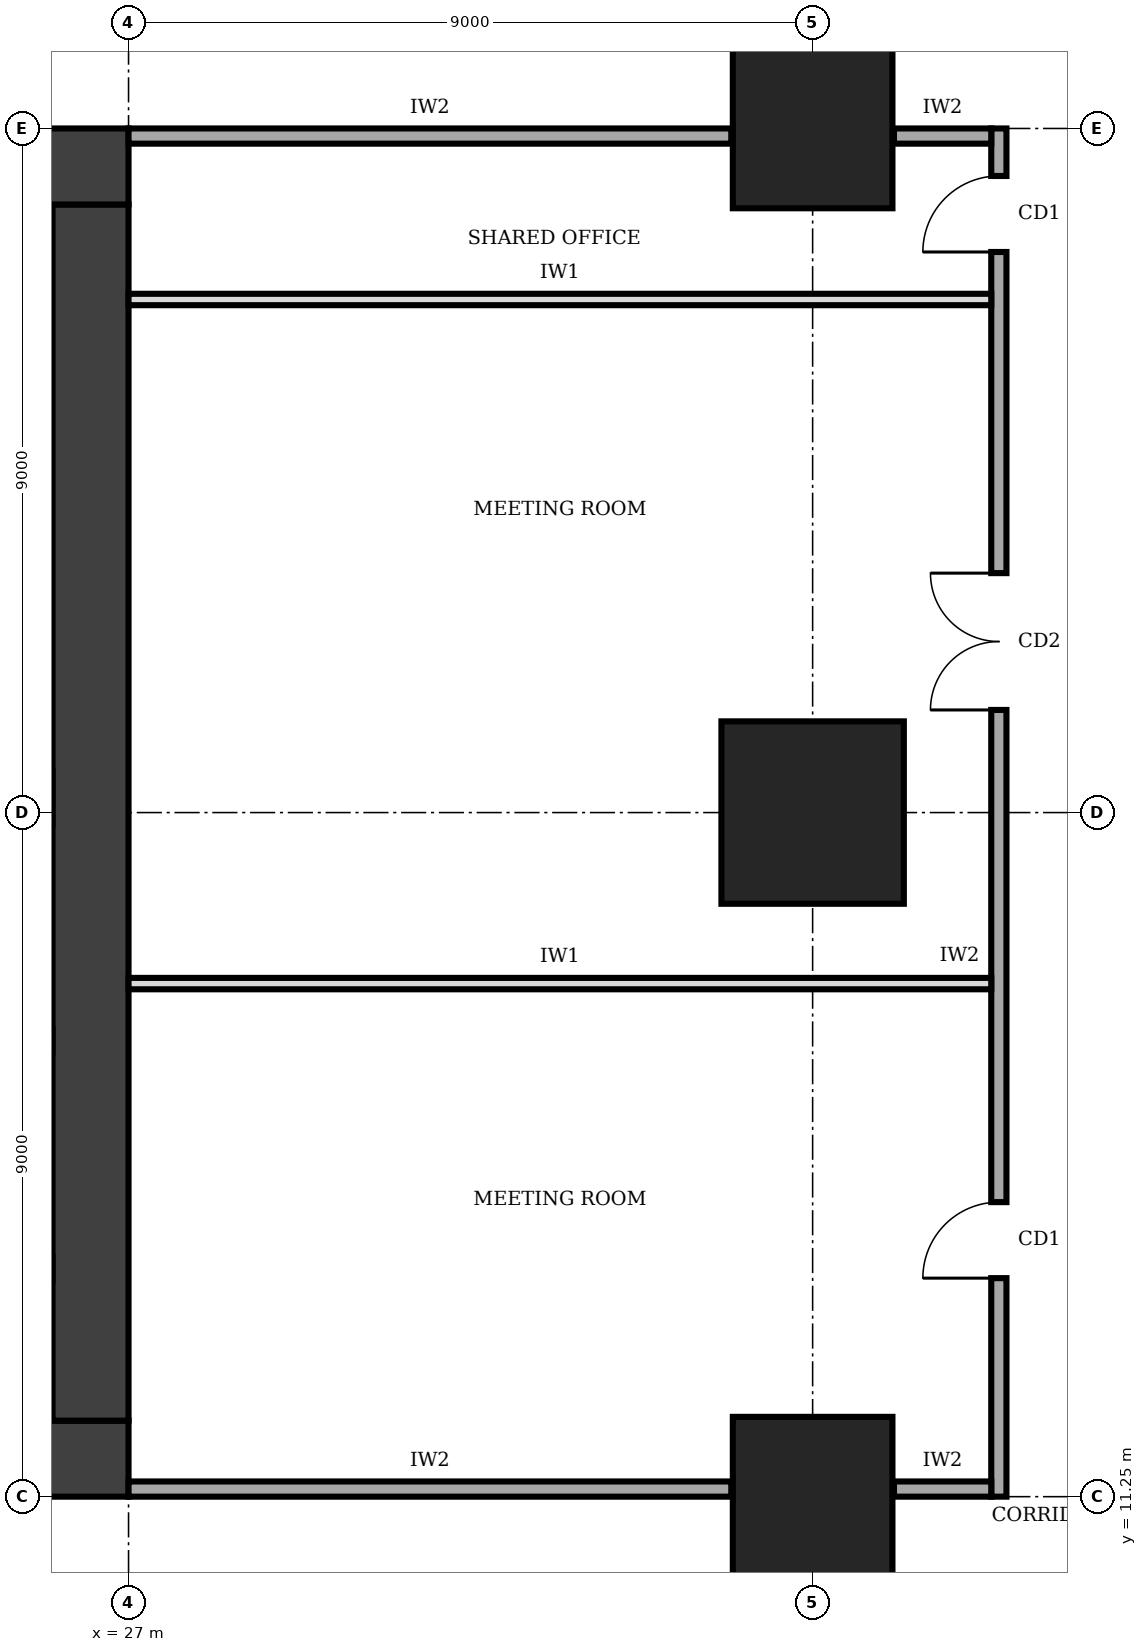
"""IFC4 building model, lengths in metres.
Left out: names, types, materials, properties, quantities, classifications, styles, units other than length and angle.
Written with IfcOpenShell. Run it as: python <this file> out.ifc"""

import sys

from ifc_helpers import new_model, si_unit, direction, frame, frame_2d, origin, origin_2d, place, context, subcontext, project, spatial, rectangle, extrude, element, fill, save


model = new_model("IFC4")
c1 = context("Model", 3, precision=1e-05, world=origin(), true_north=direction((0.0, 1.0)))
c2 = subcontext(c1, "Body", "Model", "MODEL_VIEW")
j1 = project(units=[si_unit("LENGTHUNIT", "METRE"), si_unit("PLANEANGLEUNIT", "RADIAN")], contexts=[c1])
p1 = place(None, origin())
s1 = spatial("IfcSite", under=j1, at=p1, CompositionType="ELEMENT")
p2 = place(p1, origin())
s2 = spatial("IfcBuilding", under=s1, at=p2, CompositionType="ELEMENT")
p3 = place(p2, frame((0.0, 0.0, 141.0)))
s3 = spatial("IfcBuildingStorey", under=s2, at=p3, CompositionType="ELEMENT", Elevation=141.0)
p4 = place(p3, frame((13.5, 11.75, 0.0), z_axis=(0.0, 0.0, 1.0), x_axis=(1.0, 0.0, 0.0)))
e1 = element("IfcWall", 1, at=p4, inside=s3, PredefinedType="SHEAR", context=c2, shape_type="SweptSolid", body=[
    extrude(rectangle(XDim=13.5, YDim=1.0, at=frame_2d((6.75, 0.0))), origin(), (0.0, 0.0, 1.0), 4.0),
])
p5 = place(p4, frame((4.75, 0.0, 0.0)))
e2 = element("IfcOpeningElement", 2, at=p5, cuts=e1, PredefinedType="OPENING", context=c2, shape_type="SweptSolid", body=[
    extrude(rectangle(XDim=1.0, YDim=2.1, at=frame_2d((0.5, 1.05))), frame((0.0, 0.51, 0.0), z_axis=(0.0, -1.0, 0.0), x_axis=(1.0, 0.0, 0.0)), (0.0, 0.0, 1.0), 1.02),
])
p6 = place(p3, frame((26.5, 12.25, 0.0), z_axis=(0.0, 0.0, 1.0), x_axis=(0.0, 1.0, 0.0)))
e3 = element("IfcWall", 3, at=p6, inside=s3, PredefinedType="SHEAR", context=c2, shape_type="SweptSolid", body=[
    extrude(rectangle(XDim=16.0, YDim=1.0, at=frame_2d((8.0, 0.0))), origin(), (0.0, 0.0, 1.0), 4.0),
])
p7 = place(p3, frame((27.0, 28.75, 0.0), z_axis=(0.0, 0.0, 1.0), x_axis=(-1.0, 0.0, 0.0)))
e4 = element("IfcWall", 4, at=p7, inside=s3, PredefinedType="SHEAR", context=c2, shape_type="SweptSolid", body=[
    extrude(rectangle(XDim=13.5, YDim=1.0, at=frame_2d((6.75, 0.0))), origin(), (0.0, 0.0, 1.0), 4.0),
])
p8 = place(p7, frame((4.75, 0.0, 0.0)))
e5 = element("IfcOpeningElement", 5, at=p8, cuts=e4, PredefinedType="OPENING", context=c2, shape_type="SweptSolid", body=[
    extrude(rectangle(XDim=1.8, YDim=2.1, at=frame_2d((0.9, 1.05))), frame((0.0, 0.51, 0.0), z_axis=(0.0, -1.0, 0.0), x_axis=(1.0, 0.0, 0.0)), (0.0, 0.0, 1.0), 1.02),
])
p9 = place(p3, frame((36.0, 11.25, 0.0), z_axis=(0.0, 0.0, 1.0), x_axis=(1.0, 0.0, 0.0)))
e6 = element("IfcColumn", 6, at=p9, inside=s3, PredefinedType="COLUMN", context=c2, shape_type="SweptSolid", body=[
    extrude(rectangle(XDim=2.1, YDim=2.1, at=origin_2d()), origin(), (0.0, 0.0, 1.0), 4.0),
])
p10 = place(p3, frame((36.0, 20.25, 0.0), z_axis=(0.0, 0.0, 1.0), x_axis=(1.0, 0.0, 0.0)))
e7 = element("IfcColumn", 7, at=p10, inside=s3, PredefinedType="COLUMN", context=c2, shape_type="SweptSolid", body=[
    extrude(rectangle(XDim=2.4, YDim=2.4, at=origin_2d()), origin(), (0.0, 0.0, 1.0), 4.0),
])
p11 = place(p3, frame((36.0, 29.25, 0.0), z_axis=(0.0, 0.0, 1.0), x_axis=(1.0, 0.0, 0.0)))
e8 = element("IfcColumn", 8, at=p11, inside=s3, PredefinedType="COLUMN", context=c2, shape_type="SweptSolid", body=[
    extrude(rectangle(XDim=2.1, YDim=2.1, at=origin_2d()), origin(), (0.0, 0.0, 1.0), 4.0),
])
p12 = place(p3, frame((38.45, 11.25, 0.0), z_axis=(0.0, 0.0, 1.0), x_axis=(0.0, 1.0, 0.0)))
e9 = element("IfcWall", 9, at=p12, inside=s3, PredefinedType="SOLIDWALL", context=c2, shape_type="SweptSolid", body=[
    extrude(rectangle(XDim=18.0, YDim=0.2, at=frame_2d((9.0, 0.0))), origin(), (0.0, 0.0, 1.0), 3.75),
])
p13 = place(p12, frame((2.875, 0.0, 0.0)))
e10 = element("IfcOpeningElement", 10, at=p13, cuts=e9, PredefinedType="OPENING", context=c2, shape_type="SweptSolid", body=[
    extrude(rectangle(XDim=1.0, YDim=2.1, at=frame_2d((0.5, 1.05))), frame((0.0, 0.11, 0.0), z_axis=(0.0, -1.0, 0.0), x_axis=(1.0, 0.0, 0.0)), (0.0, 0.0, 1.0), 0.22),
])
p14 = place(p12, frame((10.35, 0.0, 0.0)))
e11 = element("IfcOpeningElement", 11, at=p14, cuts=e9, PredefinedType="OPENING", context=c2, shape_type="SweptSolid", body=[
    extrude(rectangle(XDim=1.8, YDim=2.1, at=frame_2d((0.9, 1.05))), frame((0.0, 0.11, 0.0), z_axis=(0.0, -1.0, 0.0), x_axis=(1.0, 0.0, 0.0)), (0.0, 0.0, 1.0), 0.22),
])
p15 = place(p12, frame((16.375, 0.0, 0.0)))
e12 = element("IfcOpeningElement", 12, at=p15, cuts=e9, PredefinedType="OPENING", context=c2, shape_type="SweptSolid", body=[
    extrude(rectangle(XDim=1.0, YDim=2.1, at=frame_2d((0.5, 1.05))), frame((0.0, 0.11, 0.0), z_axis=(0.0, -1.0, 0.0), x_axis=(1.0, 0.0, 0.0)), (0.0, 0.0, 1.0), 0.22),
])
p16 = place(p3, frame((27.0, 11.35, 0.0), z_axis=(0.0, 0.0, 1.0), x_axis=(1.0, 0.0, 0.0)))
e13 = element("IfcWall", 13, at=p16, inside=s3, PredefinedType="SOLIDWALL", context=c2, shape_type="SweptSolid", body=[
    extrude(rectangle(XDim=7.93, YDim=0.2, at=frame_2d((3.965, 0.0))), origin(), (0.0, 0.0, 1.0), 2.85),
])
p17 = place(p3, frame((37.07, 11.35, 0.0), z_axis=(0.0, 0.0, 1.0), x_axis=(1.0, 0.0, 0.0)))
e14 = element("IfcWall", 14, at=p17, inside=s3, PredefinedType="SOLIDWALL", context=c2, shape_type="SweptSolid", body=[
    extrude(rectangle(XDim=1.28, YDim=0.2, at=frame_2d((0.64, 0.0))), origin(), (0.0, 0.0, 1.0), 2.85),
])
p18 = place(p3, frame((27.0, 29.15, 0.0), z_axis=(0.0, 0.0, 1.0), x_axis=(1.0, 0.0, 0.0)))
e15 = element("IfcWall", 15, at=p18, inside=s3, PredefinedType="SOLIDWALL", context=c2, shape_type="SweptSolid", body=[
    extrude(rectangle(XDim=7.93, YDim=0.2, at=frame_2d((3.965, 0.0))), origin(), (0.0, 0.0, 1.0), 2.85),
])
p19 = place(p3, frame((37.07, 29.15, 0.0), z_axis=(0.0, 0.0, 1.0), x_axis=(1.0, 0.0, 0.0)))
e16 = element("IfcWall", 16, at=p19, inside=s3, PredefinedType="SOLIDWALL", context=c2, shape_type="SweptSolid", body=[
    extrude(rectangle(XDim=1.28, YDim=0.2, at=frame_2d((0.64, 0.0))), origin(), (0.0, 0.0, 1.0), 2.85),
])
for number, where, z_axis, x_axis in (
    (17, (27.0, 18.0, 0.0), (0.0, 0.0, 1.0), (1.0, 0.0, 0.0)),
    (18, (27.0, 27.0, 0.0), (0.0, 0.0, 1.0), (1.0, 0.0, 0.0)),
):
    element("IfcWall", number, at=place(p3, frame(where, z_axis=z_axis, x_axis=x_axis)), inside=s3, PredefinedType="PARTITIONING", context=c2, shape_type="SweptSolid", body=[
        extrude(rectangle(XDim=11.35, YDim=0.15, at=frame_2d((5.675, 0.0))), origin(), (0.0, 0.0, 1.0), 3.75),
    ])
p20 = place(p13, origin())
e19 = element("IfcDoor", 19, at=p20, inside=s3, OperationType="SINGLE_SWING_LEFT", PredefinedType="DOOR", context=c2, shape_type="SweptSolid", body=[
    extrude(rectangle(XDim=1.0, YDim=2.1, at=frame_2d((0.5, 1.05))), frame((0.0, 0.025, 0.0), z_axis=(0.0, -1.0, 0.0), x_axis=(1.0, 0.0, 0.0)), (0.0, 0.0, 1.0), 0.05),
])
fill(e10, e19)
p21 = place(p14, origin())
e20 = element("IfcDoor", 20, at=p21, inside=s3, OperationType="DOUBLE_DOOR_SINGLE_SWING", PredefinedType="DOOR", context=c2, shape_type="SweptSolid", body=[
    extrude(rectangle(XDim=1.8, YDim=2.1, at=frame_2d((0.9, 1.05))), frame((0.0, 0.025, 0.0), z_axis=(0.0, -1.0, 0.0), x_axis=(1.0, 0.0, 0.0)), (0.0, 0.0, 1.0), 0.05),
])
fill(e11, e20)
p22 = place(p15, origin())
e21 = element("IfcDoor", 21, at=p22, inside=s3, OperationType="SINGLE_SWING_LEFT", PredefinedType="DOOR", context=c2, shape_type="SweptSolid", body=[
    extrude(rectangle(XDim=1.0, YDim=2.1, at=frame_2d((0.5, 1.05))), frame((0.0, 0.025, 0.0), z_axis=(0.0, -1.0, 0.0), x_axis=(1.0, 0.0, 0.0)), (0.0, 0.0, 1.0), 0.05),
])
fill(e12, e21)
save(model, sys.argv[1])
